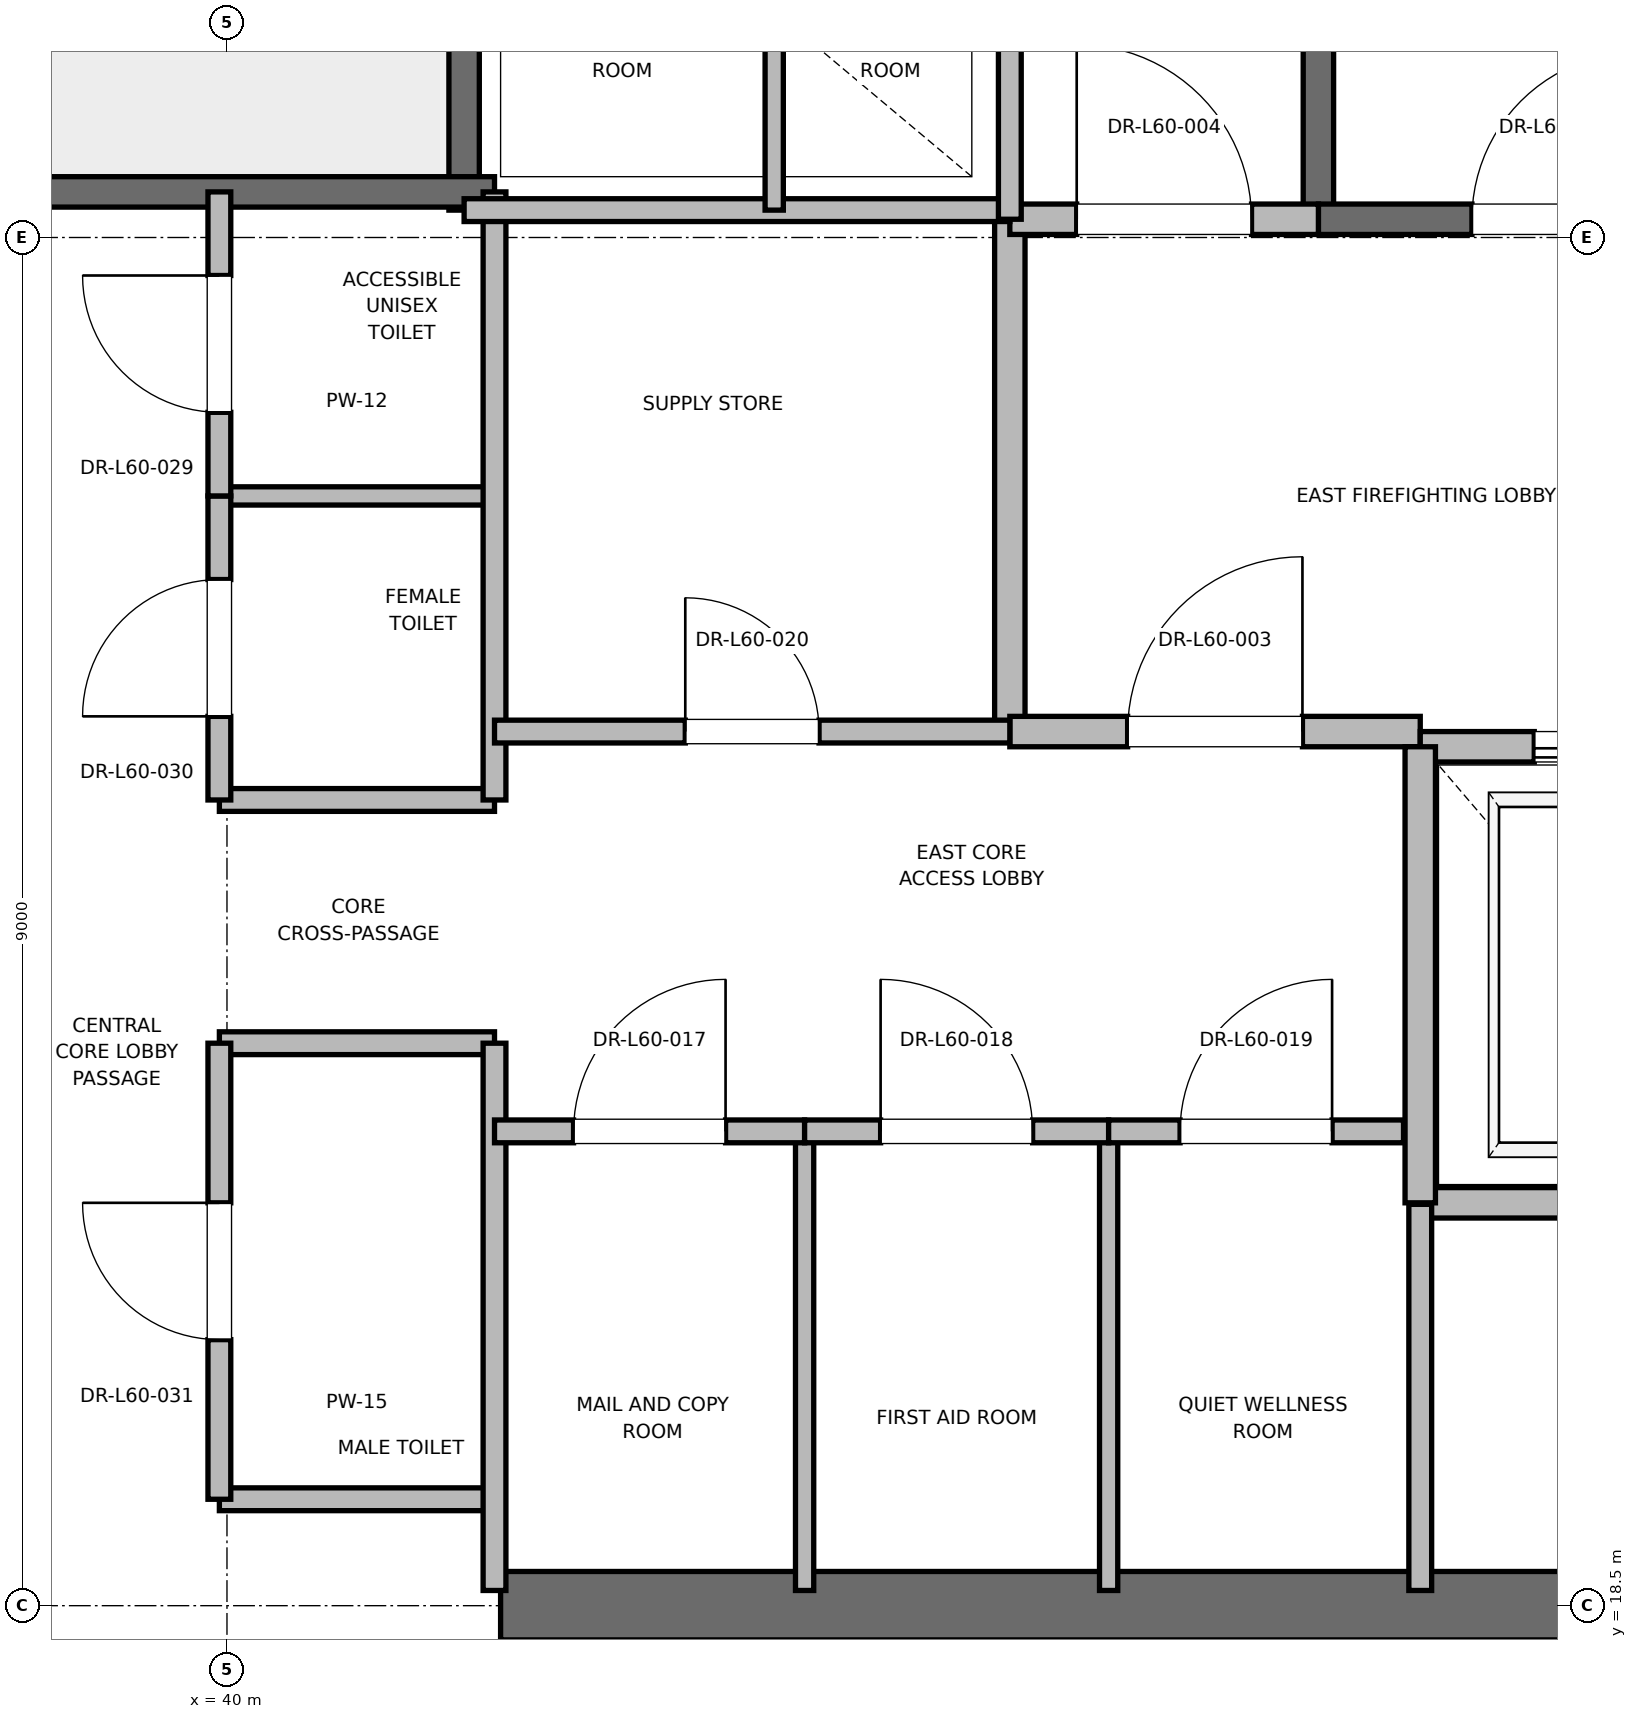
"""IFC4 building model, lengths in metres.
Left out: names, types, materials, properties, quantities, classifications, styles, units other than length and angle.
Written with IfcOpenShell. Run it as: python <this file> out.ifc"""

import sys

from ifc_helpers import new_model, si_unit, direction, frame, frame_2d, origin, place, context, subcontext, project, spatial, rectangle, extrude, element, fill, save


model = new_model("IFC4")
c1 = context("Model", 3, precision=1e-05, world=origin(), true_north=direction((0.0, 1.0)))
c2 = subcontext(c1, "Body", "Model", "MODEL_VIEW")
j1 = project(units=[si_unit("LENGTHUNIT", "METRE"), si_unit("PLANEANGLEUNIT", "RADIAN")], contexts=[c1])
p1 = place(None, origin())
s1 = spatial("IfcSite", under=j1, at=p1, CompositionType="ELEMENT")
p2 = place(p1, origin())
s2 = spatial("IfcBuilding", under=s1, at=p2, CompositionType="ELEMENT")
p3 = place(p2, frame((0.0, 0.0, 259.2)))
s3 = spatial("IfcBuildingStorey", under=s2, at=p3, CompositionType="ELEMENT", Elevation=259.2)
p4 = place(p3, frame((41.8, 18.5, 0.0), z_axis=(0.0, 0.0, 1.0), x_axis=(1.0, 0.0, 0.0)))
e1 = element("IfcWall", 1, at=p4, inside=s3, PredefinedType="SHEAR", context=c2, shape_type="SweptSolid", body=[
    extrude(rectangle(XDim=9.2, YDim=0.45, at=frame_2d((4.6, 0.0))), origin(), (0.0, 0.0, 1.0), 3.785),
])
p5 = place(p3, frame((47.18, 27.62, 0.0), z_axis=(0.0, 0.0, 1.0), x_axis=(0.0, 1.0, 0.0)))
e2 = element("IfcWall", 2, at=p5, inside=s3, PredefinedType="SOLIDWALL", context=c2, shape_type="SweptSolid", body=[
    extrude(rectangle(XDim=8.18, YDim=0.2, at=frame_2d((4.09, 0.0))), origin(), (0.0, 0.0, 1.0), 3.785),
])
p6 = place(p3, frame((47.18, 27.62, 0.0), z_axis=(0.0, 0.0, 1.0), x_axis=(1.0, 0.0, 0.0)))
e3 = element("IfcWall", 3, at=p6, inside=s3, PredefinedType="SOLIDWALL", context=c2, shape_type="SweptSolid", body=[
    extrude(rectangle(XDim=3.12, YDim=0.2, at=frame_2d((1.56, 0.0))), origin(), (0.0, 0.0, 1.0), 3.785),
])
p7 = place(p6, frame((1.01, 0.0, 0.0)))
e4 = element("IfcOpeningElement", 4, at=p7, cuts=e3, PredefinedType="OPENING", context=c2, shape_type="SweptSolid", body=[
    extrude(rectangle(XDim=1.1, YDim=2.15, at=frame_2d((0.55, 1.075))), frame((0.0, 0.1, 0.0), z_axis=(0.0, -1.0, 0.0), x_axis=(1.0, 0.0, 0.0)), (0.0, 0.0, 1.0), 0.2),
])
p8 = place(p3, frame((41.56, 27.68, 0.0), z_axis=(0.0, 0.0, 1.0), x_axis=(0.0, 1.0, 0.0)))
e5 = element("IfcWall", 5, at=p8, inside=s3, PredefinedType="SOLIDWALL", context=c2, shape_type="SweptSolid", body=[
    extrude(rectangle(XDim=8.57, YDim=0.2, at=frame_2d((4.285, 0.0))), origin(), (0.0, 0.0, 1.0), 3.785),
])
p9 = place(p3, frame((38.44, 27.8, 0.0), z_axis=(0.0, 0.0, 1.0), x_axis=(1.0, 0.0, 0.0)))
e6 = element("IfcWall", 6, at=p9, inside=s3, PredefinedType="SOLIDWALL", context=c2, shape_type="SweptSolid", body=[
    extrude(rectangle(XDim=3.32, YDim=0.2, at=frame_2d((1.66, 0.0))), origin(), (0.0, 0.0, 1.0), 3.785),
])
p10 = place(p3, frame((45.15, 24.25, 0.0), z_axis=(0.0, 0.0, 1.0), x_axis=(0.0, 1.0, 0.0)))
e7 = element("IfcWall", 7, at=p10, inside=s3, PredefinedType="PARTITIONING", context=c2, shape_type="SweptSolid", body=[
    extrude(rectangle(XDim=3.37, YDim=0.2, at=frame_2d((1.685, 0.0))), origin(), (0.0, 0.0, 1.0), 3.785),
])
p11 = place(p3, frame((45.15, 24.25, 0.0), z_axis=(0.0, 0.0, 1.0), x_axis=(1.0, 0.0, 0.0)))
e8 = element("IfcWall", 8, at=p11, inside=s3, PredefinedType="PARTITIONING", context=c2, shape_type="SweptSolid", body=[
    extrude(rectangle(XDim=2.7, YDim=0.2, at=frame_2d((1.35, 0.0))), origin(), (0.0, 0.0, 1.0), 3.785),
])
p12 = place(p11, frame((0.775, 0.0, 0.0)))
e9 = element("IfcOpeningElement", 9, at=p12, cuts=e8, PredefinedType="OPENING", context=c2, shape_type="SweptSolid", body=[
    extrude(rectangle(XDim=1.15, YDim=2.2, at=frame_2d((0.575, 1.1))), frame((0.0, 0.1, 0.0), z_axis=(0.0, -1.0, 0.0), x_axis=(1.0, 0.0, 0.0)), (0.0, 0.0, 1.0), 0.2),
])
p13 = place(p3, frame((45.15, 27.62, 0.0), z_axis=(0.0, 0.0, 1.0), x_axis=(1.0, 0.0, 0.0)))
e10 = element("IfcWall", 10, at=p13, inside=s3, PredefinedType="PARTITIONING", context=c2, shape_type="SweptSolid", body=[
    extrude(rectangle(XDim=2.03, YDim=0.2, at=frame_2d((1.015, 0.0))), origin(), (0.0, 0.0, 1.0), 3.785),
])
p14 = place(p13, frame((0.44, 0.0, 0.0)))
e11 = element("IfcOpeningElement", 11, at=p14, cuts=e10, PredefinedType="OPENING", context=c2, shape_type="SweptSolid", body=[
    extrude(rectangle(XDim=1.15, YDim=2.2, at=frame_2d((0.575, 1.1))), frame((0.0, 0.1, 0.0), z_axis=(0.0, -1.0, 0.0), x_axis=(1.0, 0.0, 0.0)), (0.0, 0.0, 1.0), 0.2),
])
p15 = place(p3, frame((47.85, 21.15, 0.0), z_axis=(0.0, 0.0, 1.0), x_axis=(1.0, 0.0, 0.0)))
e12 = element("IfcWall", 12, at=p15, inside=s3, PredefinedType="SOLIDWALL", context=c2, shape_type="SweptSolid", body=[
    extrude(rectangle(XDim=2.6, YDim=0.2, at=frame_2d((1.3, 0.0))), origin(), (0.0, 0.0, 1.0), 3.785),
])
p16 = place(p3, frame((50.45, 24.15, 0.0), z_axis=(0.0, 0.0, 1.0), x_axis=(-1.0, 0.0, 0.0)))
e13 = element("IfcWall", 13, at=p16, inside=s3, PredefinedType="SOLIDWALL", context=c2, shape_type="SweptSolid", body=[
    extrude(rectangle(XDim=2.6, YDim=0.2, at=frame_2d((1.3, 0.0))), origin(), (0.0, 0.0, 1.0), 2.865),
])
p17 = place(p16, frame((0.75, 0.0, 0.0)))
e14 = element("IfcOpeningElement", 14, at=p17, cuts=e13, PredefinedType="OPENING", context=c2, shape_type="SweptSolid", body=[
    extrude(rectangle(XDim=1.1, YDim=2.2, at=frame_2d((0.55, 1.1))), frame((0.0, 0.1, 0.0), z_axis=(0.0, -1.0, 0.0), x_axis=(1.0, 0.0, 0.0)), (0.0, 0.0, 1.0), 0.2),
])
p18 = place(p3, frame((47.85, 24.15, 0.0), z_axis=(0.0, 0.0, 1.0), x_axis=(0.0, -1.0, 0.0)))
e15 = element("IfcWall", 15, at=p18, inside=s3, PredefinedType="SOLIDWALL", context=c2, shape_type="SweptSolid", body=[
    extrude(rectangle(XDim=3.0, YDim=0.2, at=frame_2d((1.5, 0.0))), origin(), (0.0, 0.0, 1.0), 3.785),
])
for number, where, z_axis, x_axis in (
    (16, (39.95, 19.2, 0.0), (0.0, 0.0, 1.0), (1.0, 0.0, 0.0)),
    (17, (39.95, 22.2, 0.0), (0.0, 0.0, 1.0), (1.0, 0.0, 0.0)),
    (18, (39.95, 23.8, 0.0), (0.0, 0.0, 1.0), (1.0, 0.0, 0.0)),
):
    element("IfcWall", number, at=place(p3, frame(where, z_axis=z_axis, x_axis=x_axis)), inside=s3, PredefinedType="PARTITIONING", context=c2, shape_type="SweptSolid", body=[
        extrude(rectangle(XDim=1.81, YDim=0.15, at=frame_2d((0.905, 0.0))), origin(), (0.0, 0.0, 1.0), 2.85),
    ])
p19 = place(p3, frame((39.95, 25.8, 0.0), z_axis=(0.0, 0.0, 1.0), x_axis=(1.0, 0.0, 0.0)))
e19 = element("IfcWall", 19, at=p19, inside=s3, PredefinedType="PARTITIONING", context=c2, shape_type="SweptSolid", body=[
    extrude(rectangle(XDim=1.81, YDim=0.12, at=frame_2d((0.905, 0.0))), origin(), (0.0, 0.0, 1.0), 2.85),
])
p20 = place(p3, frame((41.76, 18.6, 0.0), z_axis=(0.0, 0.0, 1.0), x_axis=(0.0, 1.0, 0.0)))
e20 = element("IfcWall", 20, at=p20, inside=s3, PredefinedType="PARTITIONING", context=c2, shape_type="SweptSolid", body=[
    extrude(rectangle(XDim=3.6, YDim=0.15, at=frame_2d((1.8, 0.0))), origin(), (0.0, 0.0, 1.0), 2.85),
])
p21 = place(p3, frame((41.76, 23.8, 0.0), z_axis=(0.0, 0.0, 1.0), x_axis=(0.0, 1.0, 0.0)))
e21 = element("IfcWall", 21, at=p21, inside=s3, PredefinedType="PARTITIONING", context=c2, shape_type="SweptSolid", body=[
    extrude(rectangle(XDim=4.0, YDim=0.15, at=frame_2d((2.0, 0.0))), origin(), (0.0, 0.0, 1.0), 2.85),
])
p22 = place(p3, frame((39.95, 19.2, 0.0), z_axis=(0.0, 0.0, 1.0), x_axis=(0.0, 1.0, 0.0)))
e22 = element("IfcWall", 22, at=p22, inside=s3, PredefinedType="PARTITIONING", context=c2, shape_type="SweptSolid", body=[
    extrude(rectangle(XDim=3.0, YDim=0.15, at=frame_2d((1.5, 0.0))), origin(), (0.0, 0.0, 1.0), 2.85),
])
p23 = place(p22, frame((1.05, 0.0, 0.0)))
e23 = element("IfcOpeningElement", 23, at=p23, cuts=e22, PredefinedType="OPENING", context=c2, shape_type="SweptSolid", body=[
    extrude(rectangle(XDim=0.9, YDim=2.1, at=frame_2d((0.45, 1.05))), frame((0.0, 0.075, 0.0), z_axis=(0.0, -1.0, 0.0), x_axis=(1.0, 0.0, 0.0)), (0.0, 0.0, 1.0), 0.15),
])
p24 = place(p3, frame((39.95, 23.8, 0.0), z_axis=(0.0, 0.0, 1.0), x_axis=(0.0, 1.0, 0.0)))
e24 = element("IfcWall", 24, at=p24, inside=s3, PredefinedType="PARTITIONING", context=c2, shape_type="SweptSolid", body=[
    extrude(rectangle(XDim=2.0, YDim=0.15, at=frame_2d((1.0, 0.0))), origin(), (0.0, 0.0, 1.0), 2.85),
])
p25 = place(p24, frame((0.55, 0.0, 0.0)))
e25 = element("IfcOpeningElement", 25, at=p25, cuts=e24, PredefinedType="OPENING", context=c2, shape_type="SweptSolid", body=[
    extrude(rectangle(XDim=0.9, YDim=2.1, at=frame_2d((0.45, 1.05))), frame((0.0, 0.075, 0.0), z_axis=(0.0, -1.0, 0.0), x_axis=(1.0, 0.0, 0.0)), (0.0, 0.0, 1.0), 0.15),
])
p26 = place(p3, frame((39.95, 25.8, 0.0), z_axis=(0.0, 0.0, 1.0), x_axis=(0.0, 1.0, 0.0)))
e26 = element("IfcWall", 26, at=p26, inside=s3, PredefinedType="PARTITIONING", context=c2, shape_type="SweptSolid", body=[
    extrude(rectangle(XDim=2.0, YDim=0.15, at=frame_2d((1.0, 0.0))), origin(), (0.0, 0.0, 1.0), 2.85),
])
p27 = place(p26, frame((0.55, 0.0, 0.0)))
e27 = element("IfcOpeningElement", 27, at=p27, cuts=e26, PredefinedType="OPENING", context=c2, shape_type="SweptSolid", body=[
    extrude(rectangle(XDim=0.9, YDim=2.1, at=frame_2d((0.45, 1.05))), frame((0.0, 0.075, 0.0), z_axis=(0.0, -1.0, 0.0), x_axis=(1.0, 0.0, 0.0)), (0.0, 0.0, 1.0), 0.15),
])
p28 = place(p3, frame((41.56, 27.68, 0.0), z_axis=(0.0, 0.0, 1.0), x_axis=(1.0, 0.0, 0.0)))
e28 = element("IfcWall", 28, at=p28, inside=s3, PredefinedType="PARTITIONING", context=c2, shape_type="SweptSolid", body=[
    extrude(rectangle(XDim=3.59, YDim=0.15, at=frame_2d((1.795, 0.0))), origin(), (0.0, 0.0, 1.0), 2.85),
])
p29 = place(p3, frame((47.85, 18.6, 0.0), z_axis=(0.0, 0.0, 1.0), x_axis=(0.0, 1.0, 0.0)))
e29 = element("IfcWall", 29, at=p29, inside=s3, PredefinedType="PARTITIONING", context=c2, shape_type="SweptSolid", body=[
    extrude(rectangle(XDim=2.54, YDim=0.15, at=frame_2d((1.27, 0.0))), origin(), (0.0, 0.0, 1.0), 2.85),
])
for number, where, z_axis, x_axis in (
    (30, (43.8, 18.6, 0.0), (0.0, 0.0, 1.0), (0.0, 1.0, 0.0)),
    (31, (45.8, 18.6, 0.0), (0.0, 0.0, 1.0), (0.0, 1.0, 0.0)),
):
    element("IfcWall", number, at=place(p3, frame(where, z_axis=z_axis, x_axis=x_axis)), inside=s3, PredefinedType="PARTITIONING", context=c2, shape_type="SweptSolid", body=[
        extrude(rectangle(XDim=3.02, YDim=0.12, at=frame_2d((1.51, 0.0))), origin(), (0.0, 0.0, 1.0), 2.85),
    ])
p30 = place(p3, frame((41.76, 21.62, 0.0), z_axis=(0.0, 0.0, 1.0), x_axis=(1.0, 0.0, 0.0)))
e32 = element("IfcWall", 32, at=p30, inside=s3, PredefinedType="PARTITIONING", context=c2, shape_type="SweptSolid", body=[
    extrude(rectangle(XDim=2.04, YDim=0.15, at=frame_2d((1.02, 0.0))), origin(), (0.0, 0.0, 1.0), 2.85),
])
p31 = place(p30, frame((0.52, 0.0, 0.0)))
e33 = element("IfcOpeningElement", 33, at=p31, cuts=e32, PredefinedType="OPENING", context=c2, shape_type="SweptSolid", body=[
    extrude(rectangle(XDim=1.0, YDim=2.15, at=frame_2d((0.5, 1.075))), frame((0.0, 0.075, 0.0), z_axis=(0.0, -1.0, 0.0), x_axis=(1.0, 0.0, 0.0)), (0.0, 0.0, 1.0), 0.15),
])
p32 = place(p3, frame((43.8, 21.62, 0.0), z_axis=(0.0, 0.0, 1.0), x_axis=(1.0, 0.0, 0.0)))
e34 = element("IfcWall", 34, at=p32, inside=s3, PredefinedType="PARTITIONING", context=c2, shape_type="SweptSolid", body=[
    extrude(rectangle(XDim=2.0, YDim=0.15, at=frame_2d((1.0, 0.0))), origin(), (0.0, 0.0, 1.0), 2.85),
])
p33 = place(p32, frame((0.5, 0.0, 0.0)))
e35 = element("IfcOpeningElement", 35, at=p33, cuts=e34, PredefinedType="OPENING", context=c2, shape_type="SweptSolid", body=[
    extrude(rectangle(XDim=1.0, YDim=2.15, at=frame_2d((0.5, 1.075))), frame((0.0, 0.075, 0.0), z_axis=(0.0, -1.0, 0.0), x_axis=(1.0, 0.0, 0.0)), (0.0, 0.0, 1.0), 0.15),
])
p34 = place(p3, frame((45.8, 21.62, 0.0), z_axis=(0.0, 0.0, 1.0), x_axis=(1.0, 0.0, 0.0)))
e36 = element("IfcWall", 36, at=p34, inside=s3, PredefinedType="PARTITIONING", context=c2, shape_type="SweptSolid", body=[
    extrude(rectangle(XDim=1.94, YDim=0.15, at=frame_2d((0.97, 0.0))), origin(), (0.0, 0.0, 1.0), 2.85),
])
p35 = place(p34, frame((0.47, 0.0, 0.0)))
e37 = element("IfcOpeningElement", 37, at=p35, cuts=e36, PredefinedType="OPENING", context=c2, shape_type="SweptSolid", body=[
    extrude(rectangle(XDim=1.0, YDim=2.15, at=frame_2d((0.5, 1.075))), frame((0.0, 0.075, 0.0), z_axis=(0.0, -1.0, 0.0), x_axis=(1.0, 0.0, 0.0)), (0.0, 0.0, 1.0), 0.15),
])
p36 = place(p3, frame((41.76, 24.25, 0.0), z_axis=(0.0, 0.0, 1.0), x_axis=(1.0, 0.0, 0.0)))
e38 = element("IfcWall", 38, at=p36, inside=s3, PredefinedType="PARTITIONING", context=c2, shape_type="SweptSolid", body=[
    extrude(rectangle(XDim=3.39, YDim=0.15, at=frame_2d((1.695, 0.0))), origin(), (0.0, 0.0, 1.0), 2.85),
])
p37 = place(p36, frame((1.255, 0.0, 0.0)))
e39 = element("IfcOpeningElement", 39, at=p37, cuts=e38, PredefinedType="OPENING", context=c2, shape_type="SweptSolid", body=[
    extrude(rectangle(XDim=0.88, YDim=2.1, at=frame_2d((0.44, 1.05))), frame((0.0, 0.075, 0.0), z_axis=(0.0, -1.0, 0.0), x_axis=(1.0, 0.0, 0.0)), (0.0, 0.0, 1.0), 0.15),
])
p38 = place(p3, frame((45.15, 27.62, 0.0), z_axis=(0.0, 0.0, 1.0), x_axis=(0.0, 1.0, 0.0)))
e40 = element("IfcWall", 40, at=p38, inside=s3, PredefinedType="PARTITIONING", context=c2, shape_type="SweptSolid", body=[
    extrude(rectangle(XDim=3.1, YDim=0.15, at=frame_2d((1.55, 0.0))), origin(), (0.0, 0.0, 1.0), 2.85),
])
p39 = place(p3, frame((43.6, 27.68, 0.0), z_axis=(0.0, 0.0, 1.0), x_axis=(0.0, 1.0, 0.0)))
e41 = element("IfcWall", 41, at=p39, inside=s3, PredefinedType="PARTITIONING", context=c2, shape_type="SweptSolid", body=[
    extrude(rectangle(XDim=3.04, YDim=0.12, at=frame_2d((1.52, 0.0))), origin(), (0.0, 0.0, 1.0), 2.85),
])
p40 = place(p7, origin())
e42 = element("IfcDoor", 42, at=p40, inside=s3, OperationType="SINGLE_SWING_RIGHT", PredefinedType="DOOR", context=c2, shape_type="SweptSolid", body=[
    extrude(rectangle(XDim=1.1, YDim=2.15, at=frame_2d((0.55, 1.075))), frame((0.0, 0.025, 0.0), z_axis=(0.0, -1.0, 0.0), x_axis=(1.0, 0.0, 0.0)), (0.0, 0.0, 1.0), 0.05),
])
fill(e4, e42)
p41 = place(p12, origin())
e43 = element("IfcDoor", 43, at=p41, inside=s3, OperationType="SINGLE_SWING_RIGHT", PredefinedType="DOOR", context=c2, shape_type="SweptSolid", body=[
    extrude(rectangle(XDim=1.15, YDim=2.2, at=frame_2d((0.575, 1.1))), frame((0.0, 0.025, 0.0), z_axis=(0.0, -1.0, 0.0), x_axis=(1.0, 0.0, 0.0)), (0.0, 0.0, 1.0), 0.05),
])
fill(e9, e43)
p42 = place(p14, origin())
e44 = element("IfcDoor", 44, at=p42, inside=s3, OperationType="SINGLE_SWING_LEFT", PredefinedType="DOOR", context=c2, shape_type="SweptSolid", body=[
    extrude(rectangle(XDim=1.15, YDim=2.2, at=frame_2d((0.575, 1.1))), frame((0.0, 0.025, 0.0), z_axis=(0.0, -1.0, 0.0), x_axis=(1.0, 0.0, 0.0)), (0.0, 0.0, 1.0), 0.05),
])
fill(e11, e44)
p43 = place(p17, origin())
e45 = element("IfcDoor", 45, at=p43, inside=s3, OperationType="SLIDING_TO_RIGHT", PredefinedType="DOOR", context=c2, shape_type="SweptSolid", body=[
    extrude(rectangle(XDim=1.1, YDim=2.2, at=frame_2d((0.55, 1.1))), frame((0.0, 0.025, 0.0), z_axis=(0.0, -1.0, 0.0), x_axis=(1.0, 0.0, 0.0)), (0.0, 0.0, 1.0), 0.05),
])
fill(e14, e45)
p44 = place(p23, origin())
e46 = element("IfcDoor", 46, at=p44, inside=s3, OperationType="SINGLE_SWING_RIGHT", PredefinedType="DOOR", context=c2, shape_type="SweptSolid", body=[
    extrude(rectangle(XDim=0.9, YDim=2.1, at=frame_2d((0.45, 1.05))), frame((0.0, 0.025, 0.0), z_axis=(0.0, -1.0, 0.0), x_axis=(1.0, 0.0, 0.0)), (0.0, 0.0, 1.0), 0.05),
])
fill(e23, e46)
p45 = place(p25, origin())
e47 = element("IfcDoor", 47, at=p45, inside=s3, OperationType="SINGLE_SWING_LEFT", PredefinedType="DOOR", context=c2, shape_type="SweptSolid", body=[
    extrude(rectangle(XDim=0.9, YDim=2.1, at=frame_2d((0.45, 1.05))), frame((0.0, 0.025, 0.0), z_axis=(0.0, -1.0, 0.0), x_axis=(1.0, 0.0, 0.0)), (0.0, 0.0, 1.0), 0.05),
])
fill(e25, e47)
p46 = place(p27, origin())
e48 = element("IfcDoor", 48, at=p46, inside=s3, OperationType="SINGLE_SWING_RIGHT", PredefinedType="DOOR", context=c2, shape_type="SweptSolid", body=[
    extrude(rectangle(XDim=0.9, YDim=2.1, at=frame_2d((0.45, 1.05))), frame((0.0, 0.025, 0.0), z_axis=(0.0, -1.0, 0.0), x_axis=(1.0, 0.0, 0.0)), (0.0, 0.0, 1.0), 0.05),
])
fill(e27, e48)
p47 = place(p31, origin())
e49 = element("IfcDoor", 49, at=p47, inside=s3, OperationType="SINGLE_SWING_RIGHT", PredefinedType="DOOR", context=c2, shape_type="SweptSolid", body=[
    extrude(rectangle(XDim=1.0, YDim=2.15, at=frame_2d((0.5, 1.075))), frame((0.0, 0.025, 0.0), z_axis=(0.0, -1.0, 0.0), x_axis=(1.0, 0.0, 0.0)), (0.0, 0.0, 1.0), 0.05),
])
fill(e33, e49)
p48 = place(p33, origin())
e50 = element("IfcDoor", 50, at=p48, inside=s3, OperationType="SINGLE_SWING_LEFT", PredefinedType="DOOR", context=c2, shape_type="SweptSolid", body=[
    extrude(rectangle(XDim=1.0, YDim=2.15, at=frame_2d((0.5, 1.075))), frame((0.0, 0.025, 0.0), z_axis=(0.0, -1.0, 0.0), x_axis=(1.0, 0.0, 0.0)), (0.0, 0.0, 1.0), 0.05),
])
fill(e35, e50)
p49 = place(p35, origin())
e51 = element("IfcDoor", 51, at=p49, inside=s3, OperationType="SINGLE_SWING_RIGHT", PredefinedType="DOOR", context=c2, shape_type="SweptSolid", body=[
    extrude(rectangle(XDim=1.0, YDim=2.15, at=frame_2d((0.5, 1.075))), frame((0.0, 0.025, 0.0), z_axis=(0.0, -1.0, 0.0), x_axis=(1.0, 0.0, 0.0)), (0.0, 0.0, 1.0), 0.05),
])
fill(e37, e51)
p50 = place(p37, origin())
e52 = element("IfcDoor", 52, at=p50, inside=s3, OperationType="SINGLE_SWING_LEFT", PredefinedType="DOOR", context=c2, shape_type="SweptSolid", body=[
    extrude(rectangle(XDim=0.88, YDim=2.1, at=frame_2d((0.44, 1.05))), frame((0.0, 0.025, 0.0), z_axis=(0.0, -1.0, 0.0), x_axis=(1.0, 0.0, 0.0)), (0.0, 0.0, 1.0), 0.05),
])
fill(e39, e52)
save(model, sys.argv[1])
